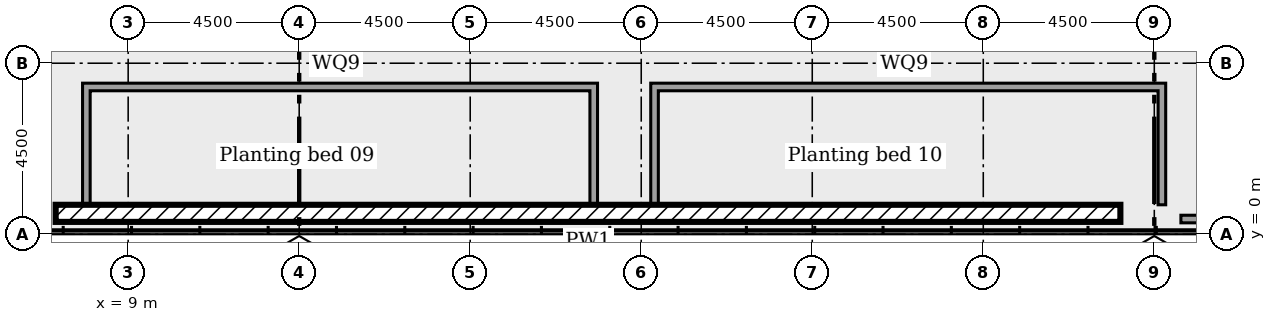
"""IFC4 building model, lengths in metres.
Left out: names, types, materials, properties, quantities, classifications, styles, units other than length and angle.
Written with IfcOpenShell. Run it as: python <this file> out.ifc"""

import sys

from ifc_helpers import new_model, si_unit, direction, frame, frame_2d, origin, place, context, subcontext, project, spatial, rectangle, extrude, element, save


model = new_model("IFC4")
c1 = context("Model", 3, precision=1e-05, world=origin(), true_north=direction((0.0, 1.0)))
c2 = subcontext(c1, "Body", "Model", "MODEL_VIEW")
j1 = project(units=[si_unit("LENGTHUNIT", "METRE"), si_unit("PLANEANGLEUNIT", "RADIAN")], contexts=[c1])
p1 = place(None, origin())
s1 = spatial("IfcSite", under=j1, at=p1, CompositionType="ELEMENT")
p2 = place(p1, origin())
s2 = spatial("IfcBuilding", under=s1, at=p2, CompositionType="ELEMENT")
p3 = place(p2, frame((0.0, 0.0, 6.0)))
s3 = spatial("IfcBuildingStorey", under=s2, at=p3, CompositionType="ELEMENT", Elevation=6.0)
p4 = place(p3, frame((7.093, 0.55, 0.0)))
e1 = element("IfcWall", 1, at=p4, inside=s3, PredefinedType="SOLIDWALL", context=c2, shape_type="SweptSolid", body=[
    extrude(rectangle(XDim=28.015, YDim=0.45, at=frame_2d((14.007, 0.0))), origin(), (0.0, 0.0, 1.0), 0.6),
])
p5 = place(p3, frame((21.25, 0.775, 0.0), z_axis=(0.0, 0.0, 1.0), x_axis=(0.0, 1.0, 0.0)))
e2 = element("IfcWall", 2, at=p5, inside=s3, PredefinedType="SOLIDWALL", context=c2, shape_type="SweptSolid", body=[
    extrude(rectangle(XDim=3.2, YDim=0.2, at=frame_2d((1.6, 0.0))), origin(), (0.0, 0.0, 1.0), 0.45),
])
p6 = place(p3, frame((7.8, 3.875, 0.0)))
e3 = element("IfcWall", 3, at=p6, inside=s3, PredefinedType="SOLIDWALL", context=c2, shape_type="SweptSolid", body=[
    extrude(rectangle(XDim=13.35, YDim=0.2, at=frame_2d((6.675, 0.0))), origin(), (0.0, 0.0, 1.0), 0.45),
])
p7 = place(p3, frame((7.9, 0.775, 0.0), z_axis=(0.0, 0.0, 1.0), x_axis=(0.0, 1.0, 0.0)))
e4 = element("IfcWall", 4, at=p7, inside=s3, PredefinedType="SOLIDWALL", context=c2, shape_type="SweptSolid", body=[
    extrude(rectangle(XDim=3.0, YDim=0.2, at=frame_2d((1.5, 0.0))), origin(), (0.0, 0.0, 1.0), 0.45),
])
p8 = place(p3, frame((36.2, 0.775, 0.0), z_axis=(0.0, 0.0, 1.0), x_axis=(0.0, 1.0, 0.0)))
e5 = element("IfcWall", 5, at=p8, inside=s3, PredefinedType="SOLIDWALL", context=c2, shape_type="SweptSolid", body=[
    extrude(rectangle(XDim=3.2, YDim=0.2, at=frame_2d((1.6, 0.0))), origin(), (0.0, 0.0, 1.0), 0.45),
])
p9 = place(p3, frame((22.75, 3.875, 0.0)))
e6 = element("IfcWall", 6, at=p9, inside=s3, PredefinedType="SOLIDWALL", context=c2, shape_type="SweptSolid", body=[
    extrude(rectangle(XDim=13.35, YDim=0.2, at=frame_2d((6.675, 0.0))), origin(), (0.0, 0.0, 1.0), 0.45),
])
p10 = place(p3, frame((22.85, 0.775, 0.0), z_axis=(0.0, 0.0, 1.0), x_axis=(0.0, 1.0, 0.0)))
e7 = element("IfcWall", 7, at=p10, inside=s3, PredefinedType="SOLIDWALL", context=c2, shape_type="SweptSolid", body=[
    extrude(rectangle(XDim=3.0, YDim=0.2, at=frame_2d((1.5, 0.0))), origin(), (0.0, 0.0, 1.0), 0.45),
])
p11 = place(p3, frame((36.7, 0.4, 0.0)))
e8 = element("IfcWall", 8, at=p11, inside=s3, PredefinedType="SOLIDWALL", context=c2, shape_type="SweptSolid", body=[
    extrude(rectangle(XDim=3.8, YDim=0.2, at=frame_2d((1.9, 0.0))), origin(), (0.0, 0.0, 1.0), 2.3),
])
p12 = place(p11, frame((0.6, 0.0, 0.0)))
e9 = element("IfcOpeningElement", 9, at=p12, cuts=e8, PredefinedType="OPENING", context=c2, shape_type="SweptSolid", body=[
    extrude(rectangle(XDim=2.6, YDim=2.1, at=frame_2d((1.3, 1.05))), frame((0.0, 0.11, 0.0), z_axis=(0.0, -1.0, 0.0), x_axis=(1.0, 0.0, 0.0)), (0.0, 0.0, 1.0), 0.22),
])
save(model, sys.argv[1])
